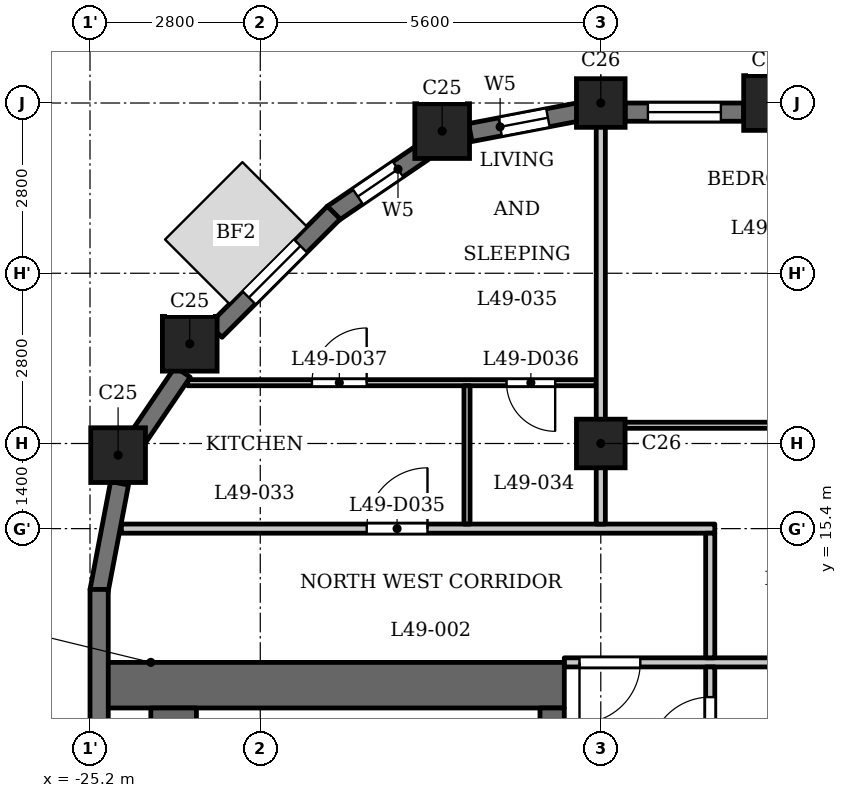
"""IFC4 building model, lengths in metres.
Left out: names, types, materials, properties, quantities, classifications, styles, units other than length and angle.
Written with IfcOpenShell. Run it as: python <this file> out.ifc"""

import sys

from ifc_helpers import new_model, si_unit, direction, frame, frame_2d, origin, origin_2d, place, context, subcontext, project, spatial, rectangle, extrude, element, fill, save


model = new_model("IFC4")
c1 = context("Model", 3, precision=1e-05, world=origin(), true_north=direction((0.0, 1.0)))
c2 = subcontext(c1, "Body", "Model", "MODEL_VIEW")
j1 = project(units=[si_unit("LENGTHUNIT", "METRE"), si_unit("PLANEANGLEUNIT", "RADIAN")], contexts=[c1])
p1 = place(None, origin())
s1 = spatial("IfcSite", under=j1, at=p1, CompositionType="ELEMENT")
p2 = place(p1, origin())
s2 = spatial("IfcBuilding", under=s1, at=p2, CompositionType="ELEMENT")
p3 = place(p2, frame((0.0, 0.0, 192.4)))
s3 = spatial("IfcBuildingStorey", under=s2, at=p3, CompositionType="ELEMENT", Elevation=192.4)
for number, where, z_axis, x_axis in (
    (1, (-14.0, 22.4, 0.0), (0.0, 0.0, 1.0), (1.0, 0.0, 0.0)),
    (2, (-19.409, 21.938, 0.0), (0.0, 0.0, 1.0), (1.0, 0.0, 0.0)),
    (3, (-23.56, 18.44, 0.0), (0.0, 0.0, 1.0), (1.0, 0.0, 0.0)),
    (4, (-24.738, 16.609, 0.0), (0.0, 0.0, 1.0), (1.0, 0.0, 0.0)),
):
    element("IfcColumn", number, at=place(p3, frame(where, z_axis=z_axis, x_axis=x_axis)), inside=s3, PredefinedType="COLUMN", context=c2, shape_type="SweptSolid", body=[
        extrude(rectangle(XDim=0.9, YDim=0.9, at=origin_2d()), origin(), (0.0, 0.0, 1.0), 3.5),
    ])
for number, where, z_axis, x_axis in (
    (5, (-16.8, 16.8, 0.0), (0.0, 0.0, 1.0), (1.0, 0.0, 0.0)),
    (6, (-16.8, 22.4, 0.0), (0.0, 0.0, 1.0), (1.0, 0.0, 0.0)),
):
    element("IfcColumn", number, at=place(p3, frame(where, z_axis=z_axis, x_axis=x_axis)), inside=s3, PredefinedType="COLUMN", context=c2, shape_type="SweptSolid", body=[
        extrude(rectangle(XDim=0.8, YDim=0.8, at=origin_2d()), origin(), (0.0, 0.0, 1.0), 3.5),
    ])
p4 = place(p3, frame((-14.45, 22.25, 0.0), z_axis=(0.0, 0.0, 1.0), x_axis=(-1.0, 0.0, 0.0)))
e7 = element("IfcWall", 7, at=p4, inside=s3, PredefinedType="SOLIDWALL", context=c2, shape_type="SweptSolid", body=[
    extrude(rectangle(XDim=1.95, YDim=0.3, at=frame_2d((0.975, 0.0))), origin(), (0.0, 0.0, 1.0), 2.5),
])
p5 = place(p4, frame((0.375, 0.0, 0.6)))
e8 = element("IfcOpeningElement", 8, at=p5, cuts=e7, PredefinedType="OPENING", context=c2, shape_type="SweptSolid", body=[
    extrude(rectangle(XDim=1.2, YDim=1.55, at=frame_2d((0.6, 0.775))), frame((0.0, 0.16, 0.0), z_axis=(0.0, -1.0, 0.0), x_axis=(1.0, 0.0, 0.0)), (0.0, 0.0, 1.0), 0.32),
])
p6 = place(p3, frame((-17.179, 22.251, 0.0), z_axis=(0.0, 0.0, 1.0), x_axis=(-0.98230529033, -0.187286722942, 0.0)))
e9 = element("IfcWall", 9, at=p6, inside=s3, PredefinedType="SOLIDWALL", context=c2, shape_type="SweptSolid", body=[
    extrude(rectangle(XDim=1.799, YDim=0.3, at=frame_2d((0.899, 0.0))), origin(), (0.0, 0.0, 1.0), 2.5),
])
p7 = place(p6, frame((0.5, 0.0, 0.6)))
e10 = element("IfcOpeningElement", 10, at=p7, cuts=e9, PredefinedType="OPENING", context=c2, shape_type="SweptSolid", body=[
    extrude(rectangle(XDim=0.8, YDim=1.55, at=frame_2d((0.4, 0.775))), frame((0.0, 0.16, 0.0), z_axis=(0.0, -1.0, 0.0), x_axis=(1.0, 0.0, 0.0)), (0.0, 0.0, 1.0), 0.32),
])
p8 = place(p3, frame((-19.719, 21.594, 0.0), z_axis=(0.0, 0.0, 1.0), x_axis=(-0.827067282455, -0.562102935673, 0.0)))
e11 = element("IfcWall", 11, at=p8, inside=s3, PredefinedType="SOLIDWALL", context=c2, shape_type="SweptSolid", body=[
    extrude(rectangle(XDim=1.806, YDim=0.3, at=frame_2d((0.903, 0.0))), origin(), (0.0, 0.0, 1.0), 2.5),
])
p9 = place(p8, frame((0.503, 0.0, 0.6)))
e12 = element("IfcOpeningElement", 12, at=p9, cuts=e11, PredefinedType="OPENING", context=c2, shape_type="SweptSolid", body=[
    extrude(rectangle(XDim=0.8, YDim=1.55, at=frame_2d((0.4, 0.775))), frame((0.0, 0.16, 0.0), z_axis=(0.0, -1.0, 0.0), x_axis=(1.0, 0.0, 0.0)), (0.0, 0.0, 1.0), 0.32),
])
p10 = place(p3, frame((-21.191, 20.597, 0.0), z_axis=(0.0, 0.0, 1.0), x_axis=(-0.707106781187, -0.707106781187, 0.0)))
e13 = element("IfcWall", 13, at=p10, inside=s3, PredefinedType="SOLIDWALL", context=c2, shape_type="SweptSolid", body=[
    extrude(rectangle(XDim=2.75, YDim=0.3, at=frame_2d((1.375, 0.0))), origin(), (0.0, 0.0, 1.0), 2.5),
])
p11 = place(p10, frame((0.775, 0.0, 0.6)))
e14 = element("IfcOpeningElement", 14, at=p11, cuts=e13, PredefinedType="OPENING", context=c2, shape_type="SweptSolid", body=[
    extrude(rectangle(XDim=1.2, YDim=1.55, at=frame_2d((0.6, 0.775))), frame((0.0, 0.16, 0.0), z_axis=(0.0, -1.0, 0.0), x_axis=(1.0, 0.0, 0.0)), (0.0, 0.0, 1.0), 0.32),
])
p12 = place(p3, frame((-23.676, 17.975, 0.0), z_axis=(0.0, 0.0, 1.0), x_axis=(-0.56200149592, -0.827136215253, 0.0)))
e15 = element("IfcWall", 15, at=p12, inside=s3, PredefinedType="SOLIDWALL", context=c2, shape_type="SweptSolid", body=[
    extrude(rectangle(XDim=1.277, YDim=0.3, at=frame_2d((0.639, 0.0))), origin(), (0.0, 0.0, 1.0), 2.5),
])
p13 = place(p3, frame((-24.714, 16.146, 0.0), z_axis=(0.0, 0.0, 1.0), x_axis=(-0.187348135549, -0.982293579388, 0.0)))
e16 = element("IfcWall", 16, at=p13, inside=s3, PredefinedType="SOLIDWALL", context=c2, shape_type="SweptSolid", body=[
    extrude(rectangle(XDim=1.806, YDim=0.3, at=frame_2d((0.903, 0.0))), origin(), (0.0, 0.0, 1.0), 2.5),
])
p14 = place(p3, frame((-25.05, 14.4, 0.0), z_axis=(0.0, 0.0, 1.0), x_axis=(0.0, -1.0, 0.0)))
e17 = element("IfcWall", 17, at=p14, inside=s3, PredefinedType="SOLIDWALL", context=c2, shape_type="SweptSolid", body=[
    extrude(rectangle(XDim=2.75, YDim=0.3, at=frame_2d((1.375, 0.0))), origin(), (0.0, 0.0, 1.0), 2.5),
])
p15 = place(p3, frame((-17.4, 12.825, 0.0), z_axis=(0.0, 0.0, 1.0), x_axis=(-1.0, 0.0, 0.0)))
e18 = element("IfcWall", 18, at=p15, inside=s3, PredefinedType="SHEAR", context=c2, shape_type="SweptSolid", body=[
    extrude(rectangle(XDim=7.6, YDim=0.75, at=frame_2d((3.8, 0.0))), origin(), (0.0, 0.0, 1.0), 3.2),
])
p16 = place(p3, frame((-17.6, -12.45, 0.0), z_axis=(0.0, 0.0, 1.0), x_axis=(0.0, 1.0, 0.0)))
e19 = element("IfcWall", 19, at=p16, inside=s3, PredefinedType="SHEAR", context=c2, shape_type="SweptSolid", body=[
    extrude(rectangle(XDim=24.9, YDim=0.4, at=frame_2d((12.45, 0.0))), origin(), (0.0, 0.0, 1.0), 3.2),
])
p17 = place(p16, frame((6.325, 0.0, 0.0)))
e20 = element("IfcOpeningElement", 20, at=p17, cuts=e19, PredefinedType="OPENING", context=c2, shape_type="SweptSolid", body=[
    extrude(rectangle(XDim=0.9, YDim=2.1, at=frame_2d((0.45, 1.05))), frame((0.0, 0.21, 0.0), z_axis=(0.0, -1.0, 0.0), x_axis=(1.0, 0.0, 0.0)), (0.0, 0.0, 1.0), 0.42),
])
p18 = place(p16, frame((9.925, 0.0, 0.0)))
e21 = element("IfcOpeningElement", 21, at=p18, cuts=e19, PredefinedType="OPENING", context=c2, shape_type="SweptSolid", body=[
    extrude(rectangle(XDim=0.9, YDim=2.1, at=frame_2d((0.45, 1.05))), frame((0.0, 0.21, 0.0), z_axis=(0.0, -1.0, 0.0), x_axis=(1.0, 0.0, 0.0)), (0.0, 0.0, 1.0), 0.42),
])
p19 = place(p16, frame((15.6, 0.0, 0.0)))
e22 = element("IfcOpeningElement", 22, at=p19, cuts=e19, PredefinedType="OPENING", context=c2, shape_type="SweptSolid", body=[
    extrude(rectangle(XDim=1.1, YDim=2.1, at=frame_2d((0.55, 1.05))), frame((0.0, 0.21, 0.0), z_axis=(0.0, -1.0, 0.0), x_axis=(1.0, 0.0, 0.0)), (0.0, 0.0, 1.0), 0.42),
])
p20 = place(p16, frame((18.0, 0.0, 0.0)))
e23 = element("IfcOpeningElement", 23, at=p20, cuts=e19, PredefinedType="OPENING", context=c2, shape_type="SweptSolid", body=[
    extrude(rectangle(XDim=1.1, YDim=2.1, at=frame_2d((0.55, 1.05))), frame((0.0, 0.21, 0.0), z_axis=(0.0, -1.0, 0.0), x_axis=(1.0, 0.0, 0.0)), (0.0, 0.0, 1.0), 0.42),
])
p21 = place(p16, frame((23.025, 0.0, 0.0)))
e24 = element("IfcOpeningElement", 24, at=p21, cuts=e19, PredefinedType="OPENING", context=c2, shape_type="SweptSolid", body=[
    extrude(rectangle(XDim=1.1, YDim=2.1, at=frame_2d((0.55, 1.05))), frame((0.0, 0.21, 0.0), z_axis=(0.0, -1.0, 0.0), x_axis=(1.0, 0.0, 0.0)), (0.0, 0.0, 1.0), 0.42),
])
p22 = place(p16, frame((0.775, 0.0, 0.0)))
e25 = element("IfcOpeningElement", 25, at=p22, cuts=e19, PredefinedType="OPENING", context=c2, shape_type="SweptSolid", body=[
    extrude(rectangle(XDim=1.1, YDim=2.1, at=frame_2d((0.55, 1.05))), frame((0.0, 0.21, 0.0), z_axis=(0.0, -1.0, 0.0), x_axis=(1.0, 0.0, 0.0)), (0.0, 0.0, 1.0), 0.42),
])
p23 = place(p16, frame((12.925, 0.0, 0.0)))
e26 = element("IfcOpeningElement", 26, at=p23, cuts=e19, PredefinedType="OPENING", context=c2, shape_type="SweptSolid", body=[
    extrude(rectangle(XDim=1.8, YDim=2.1, at=frame_2d((0.9, 1.05))), frame((0.0, 0.21, 0.0), z_axis=(0.0, -1.0, 0.0), x_axis=(1.0, 0.0, 0.0)), (0.0, 0.0, 1.0), 0.42),
])
p24 = place(p3, frame((-23.825, -12.45, 0.0), z_axis=(0.0, 0.0, 1.0), x_axis=(0.0, 1.0, 0.0)))
e27 = element("IfcWall", 27, at=p24, inside=s3, PredefinedType="SHEAR", context=c2, shape_type="SweptSolid", body=[
    extrude(rectangle(XDim=24.9, YDim=0.75, at=frame_2d((12.45, 0.0))), origin(), (0.0, 0.0, 1.0), 3.2),
])
p25 = place(p3, frame((-17.4, 13.2, 0.0), z_axis=(0.0, 0.0, 1.0), x_axis=(1.0, 0.0, 0.0)))
e28 = element("IfcWall", 28, at=p25, inside=s3, PredefinedType="PARTITIONING", context=c2, shape_type="SweptSolid", body=[
    extrude(rectangle(XDim=34.8, YDim=0.15, at=frame_2d((17.4, 0.0))), origin(), (0.0, 0.0, 1.0), 3.2),
])
p26 = place(p25, frame((0.25, 0.0, 0.0)))
e29 = element("IfcOpeningElement", 29, at=p26, cuts=e28, PredefinedType="OPENING", context=c2, shape_type="SweptSolid", body=[
    extrude(rectangle(XDim=1.0, YDim=2.1, at=frame_2d((0.5, 1.05))), frame((0.0, 0.085, 0.0), z_axis=(0.0, -1.0, 0.0), x_axis=(1.0, 0.0, 0.0)), (0.0, 0.0, 1.0), 0.17),
])
p27 = place(p25, frame((33.65, 0.0, 0.0)))
e30 = element("IfcOpeningElement", 30, at=p27, cuts=e28, PredefinedType="OPENING", context=c2, shape_type="SweptSolid", body=[
    extrude(rectangle(XDim=1.0, YDim=2.1, at=frame_2d((0.5, 1.05))), frame((0.0, 0.085, 0.0), z_axis=(0.0, -1.0, 0.0), x_axis=(1.0, 0.0, 0.0)), (0.0, 0.0, 1.0), 0.17),
])
p28 = place(p25, frame((10.15, 0.0, 0.0)))
e31 = element("IfcOpeningElement", 31, at=p28, cuts=e28, PredefinedType="OPENING", context=c2, shape_type="SweptSolid", body=[
    extrude(rectangle(XDim=1.0, YDim=2.1, at=frame_2d((0.5, 1.05))), frame((0.0, 0.085, 0.0), z_axis=(0.0, -1.0, 0.0), x_axis=(1.0, 0.0, 0.0)), (0.0, 0.0, 1.0), 0.17),
])
p29 = place(p25, frame((13.55, 0.0, 0.0)))
e32 = element("IfcOpeningElement", 32, at=p29, cuts=e28, PredefinedType="OPENING", context=c2, shape_type="SweptSolid", body=[
    extrude(rectangle(XDim=1.0, YDim=2.1, at=frame_2d((0.5, 1.05))), frame((0.0, 0.085, 0.0), z_axis=(0.0, -1.0, 0.0), x_axis=(1.0, 0.0, 0.0)), (0.0, 0.0, 1.0), 0.17),
])
p30 = place(p25, frame((20.85, 0.0, 0.0)))
e33 = element("IfcOpeningElement", 33, at=p30, cuts=e28, PredefinedType="OPENING", context=c2, shape_type="SweptSolid", body=[
    extrude(rectangle(XDim=1.0, YDim=2.1, at=frame_2d((0.5, 1.05))), frame((0.0, 0.085, 0.0), z_axis=(0.0, -1.0, 0.0), x_axis=(1.0, 0.0, 0.0)), (0.0, 0.0, 1.0), 0.17),
])
p31 = place(p25, frame((23.7, 0.0, 0.0)))
e34 = element("IfcOpeningElement", 34, at=p31, cuts=e28, PredefinedType="OPENING", context=c2, shape_type="SweptSolid", body=[
    extrude(rectangle(XDim=1.0, YDim=2.1, at=frame_2d((0.5, 1.05))), frame((0.0, 0.085, 0.0), z_axis=(0.0, -1.0, 0.0), x_axis=(1.0, 0.0, 0.0)), (0.0, 0.0, 1.0), 0.17),
])
p32 = place(p3, frame((-24.684, 15.4, 0.0), z_axis=(0.0, 0.0, 1.0), x_axis=(1.0, 0.0, 0.0)))
e35 = element("IfcWall", 35, at=p32, inside=s3, PredefinedType="PARTITIONING", context=c2, shape_type="SweptSolid", body=[
    extrude(rectangle(XDim=9.759, YDim=0.15, at=frame_2d((4.879, 0.0))), origin(), (0.0, 0.0, 1.0), 3.2),
])
p33 = place(p32, frame((4.034, 0.0, 0.0)))
e36 = element("IfcOpeningElement", 36, at=p33, cuts=e35, PredefinedType="OPENING", context=c2, shape_type="SweptSolid", body=[
    extrude(rectangle(XDim=1.0, YDim=2.1, at=frame_2d((0.5, 1.05))), frame((0.0, 0.085, 0.0), z_axis=(0.0, -1.0, 0.0), x_axis=(1.0, 0.0, 0.0)), (0.0, 0.0, 1.0), 0.17),
])
p34 = place(p3, frame((-16.725, 17.1, 0.0), z_axis=(0.0, 0.0, 1.0), x_axis=(1.0, 0.0, 0.0)))
e37 = element("IfcWall", 37, at=p34, inside=s3, PredefinedType="PARTITIONING", context=c2, shape_type="SweptSolid", body=[
    extrude(rectangle(XDim=33.45, YDim=0.1, at=frame_2d((16.725, 0.0))), origin(), (0.0, 0.0, 1.0), 3.2),
])
p35 = place(p34, frame((4.075, 0.0, 0.0)))
e38 = element("IfcOpeningElement", 38, at=p35, cuts=e37, PredefinedType="OPENING", context=c2, shape_type="SweptSolid", body=[
    extrude(rectangle(XDim=0.8, YDim=2.1, at=frame_2d((0.4, 1.05))), frame((0.0, 0.06, 0.0), z_axis=(0.0, -1.0, 0.0), x_axis=(1.0, 0.0, 0.0)), (0.0, 0.0, 1.0), 0.12),
])
p36 = place(p34, frame((9.575, 0.0, 0.0)))
e39 = element("IfcOpeningElement", 39, at=p36, cuts=e37, PredefinedType="OPENING", context=c2, shape_type="SweptSolid", body=[
    extrude(rectangle(XDim=0.9, YDim=2.1, at=frame_2d((0.45, 1.05))), frame((0.0, 0.06, 0.0), z_axis=(0.0, -1.0, 0.0), x_axis=(1.0, 0.0, 0.0)), (0.0, 0.0, 1.0), 0.12),
])
p37 = place(p34, frame((15.175, 0.0, 0.0)))
e40 = element("IfcOpeningElement", 40, at=p37, cuts=e37, PredefinedType="OPENING", context=c2, shape_type="SweptSolid", body=[
    extrude(rectangle(XDim=0.8, YDim=2.1, at=frame_2d((0.4, 1.05))), frame((0.0, 0.06, 0.0), z_axis=(0.0, -1.0, 0.0), x_axis=(1.0, 0.0, 0.0)), (0.0, 0.0, 1.0), 0.12),
])
p38 = place(p34, frame((12.975, 0.0, 0.0)))
e41 = element("IfcOpeningElement", 41, at=p38, cuts=e37, PredefinedType="OPENING", context=c2, shape_type="SweptSolid", body=[
    extrude(rectangle(XDim=0.9, YDim=2.1, at=frame_2d((0.45, 1.05))), frame((0.0, 0.06, 0.0), z_axis=(0.0, -1.0, 0.0), x_axis=(1.0, 0.0, 0.0)), (0.0, 0.0, 1.0), 0.12),
])
p39 = place(p34, frame((17.625, 0.0, 0.0)))
e42 = element("IfcOpeningElement", 42, at=p39, cuts=e37, PredefinedType="OPENING", context=c2, shape_type="SweptSolid", body=[
    extrude(rectangle(XDim=0.8, YDim=2.1, at=frame_2d((0.4, 1.05))), frame((0.0, 0.06, 0.0), z_axis=(0.0, -1.0, 0.0), x_axis=(1.0, 0.0, 0.0)), (0.0, 0.0, 1.0), 0.12),
])
p40 = place(p34, frame((20.025, 0.0, 0.0)))
e43 = element("IfcOpeningElement", 43, at=p40, cuts=e37, PredefinedType="OPENING", context=c2, shape_type="SweptSolid", body=[
    extrude(rectangle(XDim=0.9, YDim=2.1, at=frame_2d((0.45, 1.05))), frame((0.0, 0.06, 0.0), z_axis=(0.0, -1.0, 0.0), x_axis=(1.0, 0.0, 0.0)), (0.0, 0.0, 1.0), 0.12),
])
p41 = place(p34, frame((31.975, 0.0, 0.0)))
e44 = element("IfcOpeningElement", 44, at=p41, cuts=e37, PredefinedType="OPENING", context=c2, shape_type="SweptSolid", body=[
    extrude(rectangle(XDim=0.8, YDim=2.1, at=frame_2d((0.4, 1.05))), frame((0.0, 0.06, 0.0), z_axis=(0.0, -1.0, 0.0), x_axis=(1.0, 0.0, 0.0)), (0.0, 0.0, 1.0), 0.12),
])
p42 = place(p34, frame((29.775, 0.0, 0.0)))
e45 = element("IfcOpeningElement", 45, at=p42, cuts=e37, PredefinedType="OPENING", context=c2, shape_type="SweptSolid", body=[
    extrude(rectangle(XDim=0.9, YDim=2.1, at=frame_2d((0.45, 1.05))), frame((0.0, 0.06, 0.0), z_axis=(0.0, -1.0, 0.0), x_axis=(1.0, 0.0, 0.0)), (0.0, 0.0, 1.0), 0.12),
])
p43 = place(p34, frame((23.025, 0.0, 0.0)))
e46 = element("IfcOpeningElement", 46, at=p43, cuts=e37, PredefinedType="OPENING", context=c2, shape_type="SweptSolid", body=[
    extrude(rectangle(XDim=0.9, YDim=2.1, at=frame_2d((0.45, 1.05))), frame((0.0, 0.06, 0.0), z_axis=(0.0, -1.0, 0.0), x_axis=(1.0, 0.0, 0.0)), (0.0, 0.0, 1.0), 0.12),
])
p44 = place(p34, frame((26.125, 0.0, 0.0)))
e47 = element("IfcOpeningElement", 47, at=p44, cuts=e37, PredefinedType="OPENING", context=c2, shape_type="SweptSolid", body=[
    extrude(rectangle(XDim=0.9, YDim=2.1, at=frame_2d((0.45, 1.05))), frame((0.0, 0.06, 0.0), z_axis=(0.0, -1.0, 0.0), x_axis=(1.0, 0.0, 0.0)), (0.0, 0.0, 1.0), 0.12),
])
p45 = place(p3, frame((-23.594, 17.8, 0.0), z_axis=(0.0, 0.0, 1.0), x_axis=(1.0, 0.0, 0.0)))
e48 = element("IfcWall", 48, at=p45, inside=s3, PredefinedType="PARTITIONING", context=c2, shape_type="SweptSolid", body=[
    extrude(rectangle(XDim=6.719, YDim=0.1, at=frame_2d((3.359, 0.0))), origin(), (0.0, 0.0, 1.0), 3.2),
])
p46 = place(p45, frame((5.244, 0.0, 0.0)))
e49 = element("IfcOpeningElement", 49, at=p46, cuts=e48, PredefinedType="OPENING", context=c2, shape_type="SweptSolid", body=[
    extrude(rectangle(XDim=0.8, YDim=2.1, at=frame_2d((0.4, 1.05))), frame((0.0, 0.06, 0.0), z_axis=(0.0, -1.0, 0.0), x_axis=(1.0, 0.0, 0.0)), (0.0, 0.0, 1.0), 0.12),
])
p47 = place(p45, frame((2.044, 0.0, 0.0)))
e50 = element("IfcOpeningElement", 50, at=p47, cuts=e48, PredefinedType="OPENING", context=c2, shape_type="SweptSolid", body=[
    extrude(rectangle(XDim=0.9, YDim=2.1, at=frame_2d((0.45, 1.05))), frame((0.0, 0.06, 0.0), z_axis=(0.0, -1.0, 0.0), x_axis=(1.0, 0.0, 0.0)), (0.0, 0.0, 1.0), 0.12),
])
p48 = place(p3, frame((-19.0, 15.475, 0.0), z_axis=(0.0, 0.0, 1.0), x_axis=(0.0, 1.0, 0.0)))
e51 = element("IfcWall", 51, at=p48, inside=s3, PredefinedType="PARTITIONING", context=c2, shape_type="SweptSolid", body=[
    extrude(rectangle(XDim=2.275, YDim=0.1, at=frame_2d((1.137, 0.0))), origin(), (0.0, 0.0, 1.0), 3.2),
])
p49 = place(p3, frame((-16.8, 15.475, 0.0), z_axis=(0.0, 0.0, 1.0), x_axis=(0.0, 1.0, 0.0)))
e52 = element("IfcWall", 52, at=p49, inside=s3, PredefinedType="PARTITIONING", context=c2, shape_type="SweptSolid", body=[
    extrude(rectangle(XDim=6.835, YDim=0.15, at=frame_2d((3.417, 0.0))), origin(), (0.0, 0.0, 1.0), 2.55),
])
p50 = place(p3, frame((-15.0, 6.769, 0.0), z_axis=(0.0, 0.0, 1.0), x_axis=(0.0, 1.0, 0.0)))
e53 = element("IfcWall", 53, at=p50, inside=s3, PredefinedType="PARTITIONING", context=c2, shape_type="SweptSolid", body=[
    extrude(rectangle(XDim=6.356, YDim=0.15, at=frame_2d((3.178, 0.0))), origin(), (0.0, 0.0, 1.0), 3.2),
])
p51 = place(p50, frame((4.86, 0.0, 0.0)))
e54 = element("IfcOpeningElement", 54, at=p51, cuts=e53, PredefinedType="OPENING", context=c2, shape_type="SweptSolid", body=[
    extrude(rectangle(XDim=1.0, YDim=2.1, at=frame_2d((0.5, 1.05))), frame((0.0, 0.085, 0.0), z_axis=(0.0, -1.0, 0.0), x_axis=(1.0, 0.0, 0.0)), (0.0, 0.0, 1.0), 0.17),
])
p52 = place(p3, frame((-15.0, 13.275, 0.0), z_axis=(0.0, 0.0, 1.0), x_axis=(0.0, 1.0, 0.0)))
e55 = element("IfcWall", 55, at=p52, inside=s3, PredefinedType="PARTITIONING", context=c2, shape_type="SweptSolid", body=[
    extrude(rectangle(XDim=2.05, YDim=0.15, at=frame_2d((1.025, 0.0))), origin(), (0.0, 0.0, 1.0), 3.2),
])
p53 = place(p51, origin())
e56 = element("IfcDoor", 56, at=p53, inside=s3, OperationType="SINGLE_SWING_RIGHT", PredefinedType="DOOR", context=c2, shape_type="SweptSolid", body=[
    extrude(rectangle(XDim=1.0, YDim=2.1, at=frame_2d((0.5, 1.05))), frame((0.0, 0.025, 0.0), z_axis=(0.0, -1.0, 0.0), x_axis=(1.0, 0.0, 0.0)), (0.0, 0.0, 1.0), 0.05),
])
fill(e54, e56)
p54 = place(p26, origin())
e57 = element("IfcDoor", 57, at=p54, inside=s3, OperationType="SINGLE_SWING_LEFT", PredefinedType="DOOR", context=c2, shape_type="SweptSolid", body=[
    extrude(rectangle(XDim=1.0, YDim=2.1, at=frame_2d((0.5, 1.05))), frame((0.0, 0.025, 0.0), z_axis=(0.0, -1.0, 0.0), x_axis=(1.0, 0.0, 0.0)), (0.0, 0.0, 1.0), 0.05),
])
fill(e29, e57)
p55 = place(p33, origin())
e58 = element("IfcDoor", 58, at=p55, inside=s3, OperationType="SINGLE_SWING_LEFT", PredefinedType="DOOR", context=c2, shape_type="SweptSolid", body=[
    extrude(rectangle(XDim=1.0, YDim=2.1, at=frame_2d((0.5, 1.05))), frame((0.0, 0.025, 0.0), z_axis=(0.0, -1.0, 0.0), x_axis=(1.0, 0.0, 0.0)), (0.0, 0.0, 1.0), 0.05),
])
fill(e36, e58)
p56 = place(p46, origin())
e59 = element("IfcDoor", 59, at=p56, inside=s3, OperationType="SINGLE_SWING_RIGHT", PredefinedType="DOOR", context=c2, shape_type="SweptSolid", body=[
    extrude(rectangle(XDim=0.8, YDim=2.1, at=frame_2d((0.4, 1.05))), frame((0.0, 0.025, 0.0), z_axis=(0.0, -1.0, 0.0), x_axis=(1.0, 0.0, 0.0)), (0.0, 0.0, 1.0), 0.05),
])
fill(e49, e59)
p57 = place(p47, origin())
e60 = element("IfcDoor", 60, at=p57, inside=s3, OperationType="SINGLE_SWING_LEFT", PredefinedType="DOOR", context=c2, shape_type="SweptSolid", body=[
    extrude(rectangle(XDim=0.9, YDim=2.1, at=frame_2d((0.45, 1.05))), frame((0.0, 0.025, 0.0), z_axis=(0.0, -1.0, 0.0), x_axis=(1.0, 0.0, 0.0)), (0.0, 0.0, 1.0), 0.05),
])
fill(e50, e60)
p58 = place(p5, origin())
e61 = element("IfcWindow", 61, at=p58, inside=s3, PartitioningType="SINGLE_PANEL", PredefinedType="WINDOW", context=c2, shape_type="SweptSolid", body=[
    extrude(rectangle(XDim=1.2, YDim=1.55, at=frame_2d((0.6, 0.775))), frame((0.0, 0.03, 0.0), z_axis=(0.0, -1.0, 0.0), x_axis=(1.0, 0.0, 0.0)), (0.0, 0.0, 1.0), 0.06),
])
fill(e8, e61)
p59 = place(p7, origin())
e62 = element("IfcWindow", 62, at=p59, inside=s3, PartitioningType="SINGLE_PANEL", PredefinedType="WINDOW", context=c2, shape_type="SweptSolid", body=[
    extrude(rectangle(XDim=0.8, YDim=1.55, at=frame_2d((0.4, 0.775))), frame((0.0, 0.03, 0.0), z_axis=(0.0, -1.0, 0.0), x_axis=(1.0, 0.0, 0.0)), (0.0, 0.0, 1.0), 0.06),
])
fill(e10, e62)
p60 = place(p9, origin())
e63 = element("IfcWindow", 63, at=p60, inside=s3, PartitioningType="SINGLE_PANEL", PredefinedType="WINDOW", context=c2, shape_type="SweptSolid", body=[
    extrude(rectangle(XDim=0.8, YDim=1.55, at=frame_2d((0.4, 0.775))), frame((0.0, 0.03, 0.0), z_axis=(0.0, -1.0, 0.0), x_axis=(1.0, 0.0, 0.0)), (0.0, 0.0, 1.0), 0.06),
])
fill(e12, e63)
p61 = place(p11, origin())
e64 = element("IfcWindow", 64, at=p61, inside=s3, PartitioningType="SINGLE_PANEL", PredefinedType="WINDOW", context=c2, shape_type="SweptSolid", body=[
    extrude(rectangle(XDim=1.2, YDim=1.55, at=frame_2d((0.6, 0.775))), frame((0.0, 0.03, 0.0), z_axis=(0.0, -1.0, 0.0), x_axis=(1.0, 0.0, 0.0)), (0.0, 0.0, 1.0), 0.06),
])
fill(e14, e64)
save(model, sys.argv[1])
